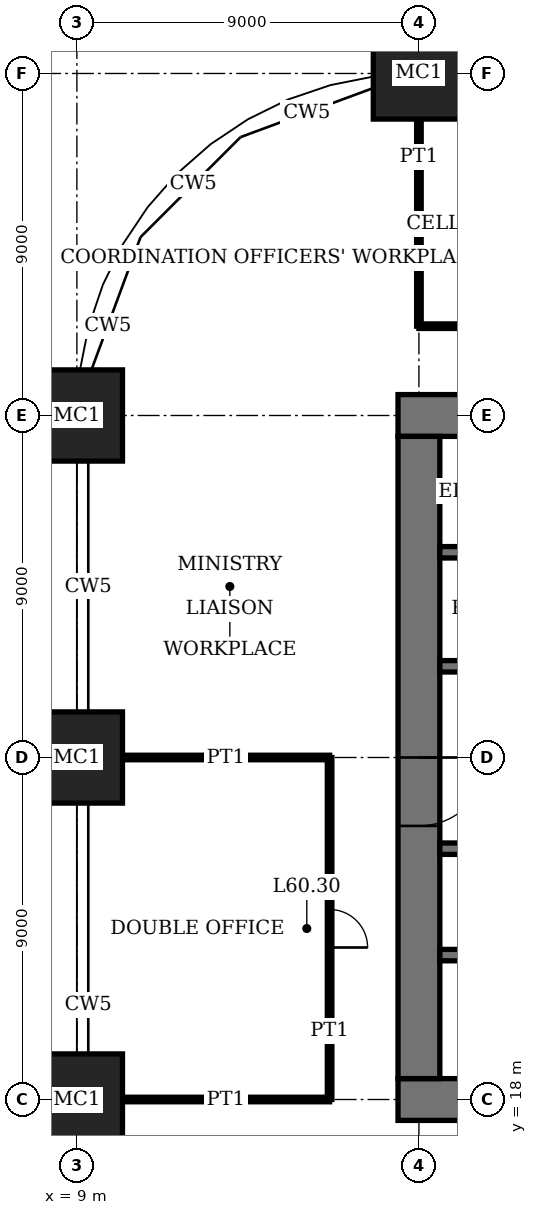
"""IFC4 building model, lengths in metres.
Left out: names, types, materials, properties, quantities, classifications, styles, units other than length and angle.
Written with IfcOpenShell. Run it as: python <this file> out.ifc"""

import sys

from ifc_helpers import new_model, si_unit, direction, frame, frame_2d, origin, origin_2d, place, context, subcontext, project, spatial, rectangle, extrude, element, fill, save


model = new_model("IFC4")
c1 = context("Model", 3, precision=1e-05, world=origin(), true_north=direction((0.0, 1.0)))
c2 = subcontext(c1, "Body", "Model", "MODEL_VIEW")
j1 = project(units=[si_unit("LENGTHUNIT", "METRE"), si_unit("PLANEANGLEUNIT", "RADIAN")], contexts=[c1])
p1 = place(None, origin())
s1 = spatial("IfcSite", under=j1, at=p1, CompositionType="ELEMENT")
p2 = place(p1, origin())
s2 = spatial("IfcBuilding", under=s1, at=p2, CompositionType="ELEMENT")
p3 = place(p2, frame((0.0, 0.0, 247.4)))
s3 = spatial("IfcBuildingStorey", under=s2, at=p3, CompositionType="ELEMENT", Elevation=247.4)
for number, where, z_axis, x_axis in (
    (1, (9.0, 18.0, 0.0), (0.0, 0.0, 1.0), (1.0, 0.0, 0.0)),
    (2, (9.0, 27.0, 0.0), (0.0, 0.0, 1.0), (1.0, 0.0, 0.0)),
    (3, (9.0, 36.0, 0.0), (0.0, 0.0, 1.0), (1.0, 0.0, 0.0)),
    (4, (18.0, 45.0, 0.0), (0.0, 0.0, 1.0), (1.0, 0.0, 0.0)),
):
    element("IfcColumn", number, at=place(p3, frame(where, z_axis=z_axis, x_axis=x_axis)), inside=s3, PredefinedType="COLUMN", context=c2, shape_type="SweptSolid", body=[
        extrude(rectangle(XDim=2.4, YDim=2.4, at=origin_2d()), origin(), (0.0, 0.0, 1.0), 4.0),
    ])
p4 = place(p3, frame((17.45, 18.0, 0.0), z_axis=(0.0, 0.0, 1.0), x_axis=(1.0, 0.0, 0.0)))
e5 = element("IfcWall", 5, at=p4, inside=s3, PredefinedType="SHEAR", context=c2, shape_type="SweptSolid", body=[
    extrude(rectangle(XDim=28.1, YDim=1.1, at=frame_2d((14.05, 0.0))), origin(), (0.0, 0.0, 1.0), 4.0),
])
p5 = place(p4, frame((11.55, 0.0, 0.0)))
e6 = element("IfcOpeningElement", 6, at=p5, cuts=e5, PredefinedType="OPENING", context=c2, shape_type="SweptSolid", body=[
    extrude(rectangle(XDim=1.0, YDim=2.4, at=frame_2d((0.5, 1.2))), frame((0.0, 0.56, 0.0), z_axis=(0.0, -1.0, 0.0), x_axis=(1.0, 0.0, 0.0)), (0.0, 0.0, 1.0), 1.12),
])
p6 = place(p4, frame((16.55, 0.0, 0.0)))
e7 = element("IfcOpeningElement", 7, at=p6, cuts=e5, PredefinedType="OPENING", context=c2, shape_type="SweptSolid", body=[
    extrude(rectangle(XDim=1.0, YDim=2.4, at=frame_2d((0.5, 1.2))), frame((0.0, 0.56, 0.0), z_axis=(0.0, -1.0, 0.0), x_axis=(1.0, 0.0, 0.0)), (0.0, 0.0, 1.0), 1.12),
])
p7 = place(p4, frame((20.0, 0.0, 0.0)))
e8 = element("IfcOpeningElement", 8, at=p7, cuts=e5, PredefinedType="OPENING", context=c2, shape_type="SweptSolid", body=[
    extrude(rectangle(XDim=1.1, YDim=2.4, at=frame_2d((0.55, 1.2))), frame((0.0, 0.56, 0.0), z_axis=(0.0, -1.0, 0.0), x_axis=(1.0, 0.0, 0.0)), (0.0, 0.0, 1.0), 1.12),
])
p8 = place(p4, frame((24.05, 0.0, 0.0)))
e9 = element("IfcOpeningElement", 9, at=p8, cuts=e5, PredefinedType="OPENING", context=c2, shape_type="SweptSolid", body=[
    extrude(rectangle(XDim=1.0, YDim=2.4, at=frame_2d((0.5, 1.2))), frame((0.0, 0.56, 0.0), z_axis=(0.0, -1.0, 0.0), x_axis=(1.0, 0.0, 0.0)), (0.0, 0.0, 1.0), 1.12),
])
p9 = place(p3, frame((45.55, 36.0, 0.0), z_axis=(0.0, 0.0, 1.0), x_axis=(-1.0, 0.0, 0.0)))
e10 = element("IfcWall", 10, at=p9, inside=s3, PredefinedType="SHEAR", context=c2, shape_type="SweptSolid", body=[
    extrude(rectangle(XDim=28.1, YDim=1.1, at=frame_2d((14.05, 0.0))), origin(), (0.0, 0.0, 1.0), 4.0),
])
p10 = place(p9, frame((11.55, 0.0, 0.0)))
e11 = element("IfcOpeningElement", 11, at=p10, cuts=e10, PredefinedType="OPENING", context=c2, shape_type="SweptSolid", body=[
    extrude(rectangle(XDim=1.0, YDim=2.4, at=frame_2d((0.5, 1.2))), frame((0.0, 0.56, 0.0), z_axis=(0.0, -1.0, 0.0), x_axis=(1.0, 0.0, 0.0)), (0.0, 0.0, 1.0), 1.12),
])
p11 = place(p9, frame((16.55, 0.0, 0.0)))
e12 = element("IfcOpeningElement", 12, at=p11, cuts=e10, PredefinedType="OPENING", context=c2, shape_type="SweptSolid", body=[
    extrude(rectangle(XDim=1.0, YDim=2.4, at=frame_2d((0.5, 1.2))), frame((0.0, 0.56, 0.0), z_axis=(0.0, -1.0, 0.0), x_axis=(1.0, 0.0, 0.0)), (0.0, 0.0, 1.0), 1.12),
])
p12 = place(p9, frame((20.0, 0.0, 0.0)))
e13 = element("IfcOpeningElement", 13, at=p12, cuts=e10, PredefinedType="OPENING", context=c2, shape_type="SweptSolid", body=[
    extrude(rectangle(XDim=1.1, YDim=2.4, at=frame_2d((0.55, 1.2))), frame((0.0, 0.56, 0.0), z_axis=(0.0, -1.0, 0.0), x_axis=(1.0, 0.0, 0.0)), (0.0, 0.0, 1.0), 1.12),
])
p13 = place(p9, frame((24.05, 0.0, 0.0)))
e14 = element("IfcOpeningElement", 14, at=p13, cuts=e10, PredefinedType="OPENING", context=c2, shape_type="SweptSolid", body=[
    extrude(rectangle(XDim=1.0, YDim=2.4, at=frame_2d((0.5, 1.2))), frame((0.0, 0.56, 0.0), z_axis=(0.0, -1.0, 0.0), x_axis=(1.0, 0.0, 0.0)), (0.0, 0.0, 1.0), 1.12),
])
p14 = place(p3, frame((18.0, 35.45, 0.0), z_axis=(0.0, 0.0, 1.0), x_axis=(0.0, -1.0, 0.0)))
e15 = element("IfcWall", 15, at=p14, inside=s3, PredefinedType="SHEAR", context=c2, shape_type="SweptSolid", body=[
    extrude(rectangle(XDim=16.9, YDim=1.1, at=frame_2d((8.45, 0.0))), origin(), (0.0, 0.0, 1.0), 4.0),
])
p15 = place(p14, frame((8.45, 0.0, 0.0)))
e16 = element("IfcOpeningElement", 16, at=p15, cuts=e15, PredefinedType="OPENING", context=c2, shape_type="SweptSolid", body=[
    extrude(rectangle(XDim=1.8, YDim=2.4, at=frame_2d((0.9, 1.2))), frame((0.0, 0.56, 0.0), z_axis=(0.0, -1.0, 0.0), x_axis=(1.0, 0.0, 0.0)), (0.0, 0.0, 1.0), 1.12),
])
p16 = place(p3, frame((18.55, 21.8, 0.0), z_axis=(0.0, 0.0, 1.0), x_axis=(1.0, 0.0, 0.0)))
e17 = element("IfcWall", 17, at=p16, inside=s3, PredefinedType="SHEAR", context=c2, shape_type="SweptSolid", body=[
    extrude(rectangle(XDim=8.3, YDim=0.3, at=frame_2d((4.15, 0.0))), origin(), (0.0, 0.0, 1.0), 4.0),
])
p17 = place(p16, frame((6.85, 0.0, 0.0)))
e18 = element("IfcOpeningElement", 18, at=p17, cuts=e17, PredefinedType="OPENING", context=c2, shape_type="SweptSolid", body=[
    extrude(rectangle(XDim=1.0, YDim=2.4, at=frame_2d((0.5, 1.2))), frame((0.0, 0.16, 0.0), z_axis=(0.0, -1.0, 0.0), x_axis=(1.0, 0.0, 0.0)), (0.0, 0.0, 1.0), 0.32),
])
p18 = place(p3, frame((18.55, 24.6, 0.0), z_axis=(0.0, 0.0, 1.0), x_axis=(1.0, 0.0, 0.0)))
e19 = element("IfcWall", 19, at=p18, inside=s3, PredefinedType="SHEAR", context=c2, shape_type="SweptSolid", body=[
    extrude(rectangle(XDim=25.9, YDim=0.3, at=frame_2d((12.95, 0.0))), origin(), (0.0, 0.0, 1.0), 4.0),
])
p19 = place(p18, frame((4.95, 0.0, 0.0)))
e20 = element("IfcOpeningElement", 20, at=p19, cuts=e19, PredefinedType="OPENING", context=c2, shape_type="SweptSolid", body=[
    extrude(rectangle(XDim=1.0, YDim=2.4, at=frame_2d((0.5, 1.2))), frame((0.0, 0.16, 0.0), z_axis=(0.0, -1.0, 0.0), x_axis=(1.0, 0.0, 0.0)), (0.0, 0.0, 1.0), 0.32),
])
p20 = place(p18, frame((24.5, 0.0, 0.0)))
e21 = element("IfcOpeningElement", 21, at=p20, cuts=e19, PredefinedType="OPENING", context=c2, shape_type="SweptSolid", body=[
    extrude(rectangle(XDim=0.9, YDim=2.1, at=frame_2d((0.45, 1.05))), frame((0.0, 0.16, 0.0), z_axis=(0.0, -1.0, 0.0), x_axis=(1.0, 0.0, 0.0)), (0.0, 0.0, 1.0), 0.32),
])
p21 = place(p18, frame((9.4, 0.0, 0.0)))
e22 = element("IfcOpeningElement", 22, at=p21, cuts=e19, PredefinedType="OPENING", context=c2, shape_type="SweptSolid", body=[
    extrude(rectangle(XDim=1.1, YDim=2.4, at=frame_2d((0.55, 1.2))), frame((0.0, 0.16, 0.0), z_axis=(0.0, -1.0, 0.0), x_axis=(1.0, 0.0, 0.0)), (0.0, 0.0, 1.0), 0.32),
])
p22 = place(p18, frame((12.4, 0.0, 0.0)))
e23 = element("IfcOpeningElement", 23, at=p22, cuts=e19, PredefinedType="OPENING", context=c2, shape_type="SweptSolid", body=[
    extrude(rectangle(XDim=1.1, YDim=2.4, at=frame_2d((0.55, 1.2))), frame((0.0, 0.16, 0.0), z_axis=(0.0, -1.0, 0.0), x_axis=(1.0, 0.0, 0.0)), (0.0, 0.0, 1.0), 0.32),
])
p23 = place(p18, frame((15.4, 0.0, 0.0)))
e24 = element("IfcOpeningElement", 24, at=p23, cuts=e19, PredefinedType="OPENING", context=c2, shape_type="SweptSolid", body=[
    extrude(rectangle(XDim=1.1, YDim=2.4, at=frame_2d((0.55, 1.2))), frame((0.0, 0.16, 0.0), z_axis=(0.0, -1.0, 0.0), x_axis=(1.0, 0.0, 0.0)), (0.0, 0.0, 1.0), 0.32),
])
p24 = place(p18, frame((18.4, 0.0, 0.0)))
e25 = element("IfcOpeningElement", 25, at=p24, cuts=e19, PredefinedType="OPENING", context=c2, shape_type="SweptSolid", body=[
    extrude(rectangle(XDim=1.1, YDim=2.4, at=frame_2d((0.55, 1.2))), frame((0.0, 0.16, 0.0), z_axis=(0.0, -1.0, 0.0), x_axis=(1.0, 0.0, 0.0)), (0.0, 0.0, 1.0), 0.32),
])
p25 = place(p18, frame((21.3, 0.0, 0.0)))
e26 = element("IfcOpeningElement", 26, at=p25, cuts=e19, PredefinedType="OPENING", context=c2, shape_type="SweptSolid", body=[
    extrude(rectangle(XDim=1.3, YDim=2.4, at=frame_2d((0.65, 1.2))), frame((0.0, 0.16, 0.0), z_axis=(0.0, -1.0, 0.0), x_axis=(1.0, 0.0, 0.0)), (0.0, 0.0, 1.0), 0.32),
])
p26 = place(p3, frame((18.55, 29.4, 0.0), z_axis=(0.0, 0.0, 1.0), x_axis=(1.0, 0.0, 0.0)))
e27 = element("IfcWall", 27, at=p26, inside=s3, PredefinedType="SHEAR", context=c2, shape_type="SweptSolid", body=[
    extrude(rectangle(XDim=25.9, YDim=0.3, at=frame_2d((12.95, 0.0))), origin(), (0.0, 0.0, 1.0), 4.0),
])
p27 = place(p26, frame((19.95, 0.0, 0.0)))
e28 = element("IfcOpeningElement", 28, at=p27, cuts=e27, PredefinedType="OPENING", context=c2, shape_type="SweptSolid", body=[
    extrude(rectangle(XDim=1.0, YDim=2.4, at=frame_2d((0.5, 1.2))), frame((0.0, 0.16, 0.0), z_axis=(0.0, -1.0, 0.0), x_axis=(1.0, 0.0, 0.0)), (0.0, 0.0, 1.0), 0.32),
])
p28 = place(p26, frame((0.5, 0.0, 0.0)))
e29 = element("IfcOpeningElement", 29, at=p28, cuts=e27, PredefinedType="OPENING", context=c2, shape_type="SweptSolid", body=[
    extrude(rectangle(XDim=0.9, YDim=2.1, at=frame_2d((0.45, 1.05))), frame((0.0, 0.16, 0.0), z_axis=(0.0, -1.0, 0.0), x_axis=(1.0, 0.0, 0.0)), (0.0, 0.0, 1.0), 0.32),
])
p29 = place(p26, frame((15.45, 0.0, 0.0)))
e30 = element("IfcOpeningElement", 30, at=p29, cuts=e27, PredefinedType="OPENING", context=c2, shape_type="SweptSolid", body=[
    extrude(rectangle(XDim=1.0, YDim=2.4, at=frame_2d((0.5, 1.2))), frame((0.0, 0.16, 0.0), z_axis=(0.0, -1.0, 0.0), x_axis=(1.0, 0.0, 0.0)), (0.0, 0.0, 1.0), 0.32),
])
p30 = place(p26, frame((12.45, 0.0, 0.0)))
e31 = element("IfcOpeningElement", 31, at=p30, cuts=e27, PredefinedType="OPENING", context=c2, shape_type="SweptSolid", body=[
    extrude(rectangle(XDim=1.0, YDim=2.4, at=frame_2d((0.5, 1.2))), frame((0.0, 0.16, 0.0), z_axis=(0.0, -1.0, 0.0), x_axis=(1.0, 0.0, 0.0)), (0.0, 0.0, 1.0), 0.32),
])
p31 = place(p26, frame((9.45, 0.0, 0.0)))
e32 = element("IfcOpeningElement", 32, at=p31, cuts=e27, PredefinedType="OPENING", context=c2, shape_type="SweptSolid", body=[
    extrude(rectangle(XDim=1.0, YDim=2.4, at=frame_2d((0.5, 1.2))), frame((0.0, 0.16, 0.0), z_axis=(0.0, -1.0, 0.0), x_axis=(1.0, 0.0, 0.0)), (0.0, 0.0, 1.0), 0.32),
])
p32 = place(p26, frame((6.45, 0.0, 0.0)))
e33 = element("IfcOpeningElement", 33, at=p32, cuts=e27, PredefinedType="OPENING", context=c2, shape_type="SweptSolid", body=[
    extrude(rectangle(XDim=1.0, YDim=2.4, at=frame_2d((0.5, 1.2))), frame((0.0, 0.16, 0.0), z_axis=(0.0, -1.0, 0.0), x_axis=(1.0, 0.0, 0.0)), (0.0, 0.0, 1.0), 0.32),
])
p33 = place(p26, frame((3.3, 0.0, 0.0)))
e34 = element("IfcOpeningElement", 34, at=p33, cuts=e27, PredefinedType="OPENING", context=c2, shape_type="SweptSolid", body=[
    extrude(rectangle(XDim=1.3, YDim=2.4, at=frame_2d((0.65, 1.2))), frame((0.0, 0.16, 0.0), z_axis=(0.0, -1.0, 0.0), x_axis=(1.0, 0.0, 0.0)), (0.0, 0.0, 1.0), 0.32),
])
p34 = place(p3, frame((18.55, 32.4, 0.0), z_axis=(0.0, 0.0, 1.0), x_axis=(1.0, 0.0, 0.0)))
e35 = element("IfcWall", 35, at=p34, inside=s3, PredefinedType="SHEAR", context=c2, shape_type="SweptSolid", body=[
    extrude(rectangle(XDim=17.3, YDim=0.3, at=frame_2d((8.65, 0.0))), origin(), (0.0, 0.0, 1.0), 4.0),
])
for number, where, z_axis, x_axis in (
    (36, (10.2, 18.0, 0.0), (0.0, 0.0, 1.0), (1.0, 0.0, 0.0)),
    (37, (10.2, 27.0, 0.0), (0.0, 0.0, 1.0), (1.0, 0.0, 0.0)),
):
    element("IfcWall", number, at=place(p3, frame(where, z_axis=z_axis, x_axis=x_axis)), inside=s3, PredefinedType="PARTITIONING", context=c2, shape_type="SweptSolid", body=[
        extrude(rectangle(XDim=5.45, YDim=0.12, at=frame_2d((2.725, 0.0))), origin(), (0.0, 0.0, 1.0), 3.05),
    ])
p35 = place(p3, frame((18.0, 38.35, 0.0), z_axis=(0.0, 0.0, 1.0), x_axis=(1.0, 0.0, 0.0)))
e38 = element("IfcWall", 38, at=p35, inside=s3, PredefinedType="PARTITIONING", context=c2, shape_type="SweptSolid", body=[
    extrude(rectangle(XDim=4.5, YDim=0.12, at=frame_2d((2.25, 0.0))), origin(), (0.0, 0.0, 1.0), 3.75),
])
p36 = place(p35, frame((1.75, 0.0, 0.0)))
e39 = element("IfcOpeningElement", 39, at=p36, cuts=e38, PredefinedType="OPENING", context=c2, shape_type="SweptSolid", body=[
    extrude(rectangle(XDim=1.0, YDim=2.4, at=frame_2d((0.5, 1.2))), frame((0.0, 0.07, 0.0), z_axis=(0.0, -1.0, 0.0), x_axis=(1.0, 0.0, 0.0)), (0.0, 0.0, 1.0), 0.14),
])
p37 = place(p3, frame((15.65, 18.0, 0.0), z_axis=(0.0, 0.0, 1.0), x_axis=(0.0, 1.0, 0.0)))
e40 = element("IfcWall", 40, at=p37, inside=s3, PredefinedType="PARTITIONING", context=c2, shape_type="SweptSolid", body=[
    extrude(rectangle(XDim=9.0, YDim=0.12, at=frame_2d((4.5, 0.0))), origin(), (0.0, 0.0, 1.0), 3.75),
])
p38 = place(p37, frame((4.0, 0.0, 0.0)))
e41 = element("IfcOpeningElement", 41, at=p38, cuts=e40, PredefinedType="OPENING", context=c2, shape_type="SweptSolid", body=[
    extrude(rectangle(XDim=1.0, YDim=2.4, at=frame_2d((0.5, 1.2))), frame((0.0, 0.07, 0.0), z_axis=(0.0, -1.0, 0.0), x_axis=(1.0, 0.0, 0.0)), (0.0, 0.0, 1.0), 0.14),
])
p39 = place(p3, frame((18.0, 38.35, 0.0), z_axis=(0.0, 0.0, 1.0), x_axis=(0.0, 1.0, 0.0)))
e42 = element("IfcWall", 42, at=p39, inside=s3, PredefinedType="PARTITIONING", context=c2, shape_type="SweptSolid", body=[
    extrude(rectangle(XDim=5.45, YDim=0.12, at=frame_2d((2.725, 0.0))), origin(), (0.0, 0.0, 1.0), 3.05),
])
p40 = place(p15, origin())
e43 = element("IfcDoor", 43, at=p40, inside=s3, OperationType="DOUBLE_DOOR_DOUBLE_SWING", PredefinedType="DOOR", context=c2, shape_type="SweptSolid", body=[
    extrude(rectangle(XDim=1.8, YDim=2.4, at=frame_2d((0.9, 1.2))), frame((0.0, 0.03, 0.0), z_axis=(0.0, -1.0, 0.0), x_axis=(1.0, 0.0, 0.0)), (0.0, 0.0, 1.0), 0.06),
    extrude(rectangle(XDim=0.04, YDim=2.4, at=frame_2d((0.02, 1.2))), frame((0.0, 0.55, 0.0), z_axis=(0.0, -1.0, 0.0), x_axis=(1.0, 0.0, 0.0)), (0.0, 0.0, 1.0), 1.1),
    extrude(rectangle(XDim=0.04, YDim=2.4, at=frame_2d((1.78, 1.2))), frame((0.0, 0.55, 0.0), z_axis=(0.0, -1.0, 0.0), x_axis=(1.0, 0.0, 0.0)), (0.0, 0.0, 1.0), 1.1),
    extrude(rectangle(XDim=1.8, YDim=0.04, at=frame_2d((0.9, 2.38))), frame((0.0, 0.55, 0.0), z_axis=(0.0, -1.0, 0.0), x_axis=(1.0, 0.0, 0.0)), (0.0, 0.0, 1.0), 1.1),
])
fill(e16, e43)
p41 = place(p38, origin())
e44 = element("IfcDoor", 44, at=p41, inside=s3, OperationType="SINGLE_SWING_LEFT", PredefinedType="DOOR", context=c2, shape_type="SweptSolid", body=[
    extrude(rectangle(XDim=1.0, YDim=2.4, at=frame_2d((0.5, 1.2))), frame((0.0, 0.025, 0.0), z_axis=(0.0, -1.0, 0.0), x_axis=(1.0, 0.0, 0.0)), (0.0, 0.0, 1.0), 0.05),
])
fill(e41, e44)
save(model, sys.argv[1])
